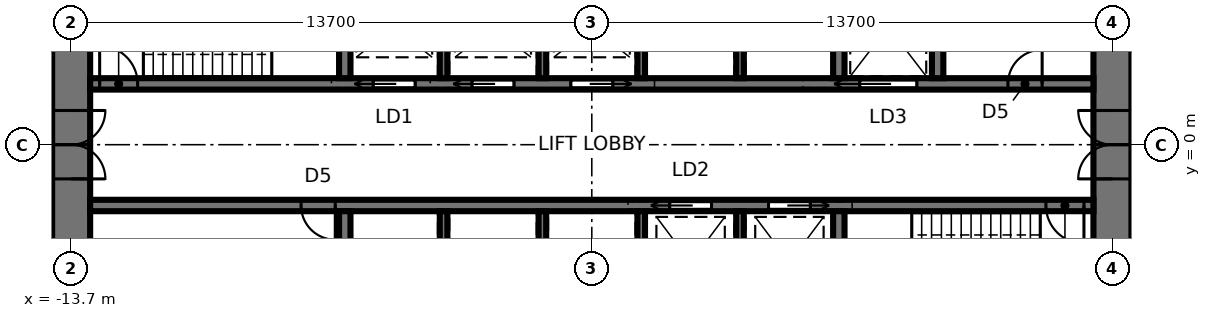
"""IFC4 building model, lengths in metres.
Left out: names, types, materials, properties, quantities, classifications, styles, units other than length and angle.
Written with IfcOpenShell. Run it as: python <this file> out.ifc"""

import sys

from ifc_helpers import new_model, si_unit, direction, frame, frame_2d, origin, place, context, subcontext, project, spatial, rectangle, extrude, element, fill, save


model = new_model("IFC4")
c1 = context("Model", 3, precision=1e-05, world=origin(), true_north=direction((0.0, 1.0)))
c2 = subcontext(c1, "Body", "Model", "MODEL_VIEW")
j1 = project(units=[si_unit("LENGTHUNIT", "METRE"), si_unit("PLANEANGLEUNIT", "RADIAN")], contexts=[c1])
p1 = place(None, origin())
s1 = spatial("IfcSite", under=j1, at=p1, CompositionType="ELEMENT")
p2 = place(p1, origin())
s2 = spatial("IfcBuilding", under=s1, at=p2, CompositionType="ELEMENT")
p3 = place(p2, frame((0.0, 0.0, 5.6)))
s3 = spatial("IfcBuildingStorey", under=s2, at=p3, CompositionType="ELEMENT", Elevation=5.6)
p4 = place(p3, frame((13.7, -9.5, 0.0), z_axis=(0.0, 0.0, 1.0), x_axis=(0.0, 1.0, 0.0)))
e1 = element("IfcWall", 1, at=p4, inside=s3, PredefinedType="SHEAR", context=c2, shape_type="SweptSolid", body=[
    extrude(rectangle(XDim=19.0, YDim=1.0, at=frame_2d((9.5, 0.0))), origin(), (0.0, 0.0, 1.0), 5.0),
])
p5 = place(p4, frame((8.6, 0.0, 0.0)))
e2 = element("IfcOpeningElement", 2, at=p5, cuts=e1, PredefinedType="OPENING", context=c2, shape_type="SweptSolid", body=[
    extrude(rectangle(XDim=1.8, YDim=2.4, at=frame_2d((0.9, 1.2))), frame((0.0, 0.51, 0.0), z_axis=(0.0, -1.0, 0.0), x_axis=(1.0, 0.0, 0.0)), (0.0, 0.0, 1.0), 1.02),
])
p6 = place(p3, frame((-13.7, 9.5, 0.0), z_axis=(0.0, 0.0, 1.0), x_axis=(0.0, -1.0, 0.0)))
e3 = element("IfcWall", 3, at=p6, inside=s3, PredefinedType="SHEAR", context=c2, shape_type="SweptSolid", body=[
    extrude(rectangle(XDim=19.0, YDim=1.0, at=frame_2d((9.5, 0.0))), origin(), (0.0, 0.0, 1.0), 5.0),
])
p7 = place(p6, frame((8.6, 0.0, 0.0)))
e4 = element("IfcOpeningElement", 4, at=p7, cuts=e3, PredefinedType="OPENING", context=c2, shape_type="SweptSolid", body=[
    extrude(rectangle(XDim=1.8, YDim=2.4, at=frame_2d((0.9, 1.2))), frame((0.0, 0.51, 0.0), z_axis=(0.0, -1.0, 0.0), x_axis=(1.0, 0.0, 0.0)), (0.0, 0.0, 1.0), 1.02),
])
p8 = place(p3, frame((-13.2, 1.6, 0.0), z_axis=(0.0, 0.0, 1.0), x_axis=(1.0, 0.0, 0.0)))
e5 = element("IfcWall", 5, at=p8, inside=s3, PredefinedType="SHEAR", context=c2, shape_type="SweptSolid", body=[
    extrude(rectangle(XDim=26.4, YDim=0.3, at=frame_2d((13.2, 0.0))), origin(), (0.0, 0.0, 1.0), 5.0),
])
p9 = place(p8, frame((0.25, 0.0, 0.0)))
e6 = element("IfcOpeningElement", 6, at=p9, cuts=e5, PredefinedType="OPENING", context=c2, shape_type="SweptSolid", body=[
    extrude(rectangle(XDim=1.0, YDim=2.1, at=frame_2d((0.5, 1.05))), frame((0.0, 0.16, 0.0), z_axis=(0.0, -1.0, 0.0), x_axis=(1.0, 0.0, 0.0)), (0.0, 0.0, 1.0), 0.32),
])
p10 = place(p8, frame((20.25, 0.0, 0.0)))
e7 = element("IfcOpeningElement", 7, at=p10, cuts=e5, PredefinedType="OPENING", context=c2, shape_type="SweptSolid", body=[
    extrude(rectangle(XDim=1.5, YDim=2.4, at=frame_2d((0.75, 1.2))), frame((0.0, 0.16, 0.0), z_axis=(0.0, -1.0, 0.0), x_axis=(1.0, 0.0, 0.0)), (0.0, 0.0, 1.0), 0.32),
])
p11 = place(p8, frame((7.45, 0.0, 0.0)))
e8 = element("IfcOpeningElement", 8, at=p11, cuts=e5, PredefinedType="OPENING", context=c2, shape_type="SweptSolid", body=[
    extrude(rectangle(XDim=1.1, YDim=2.3, at=frame_2d((0.55, 1.15))), frame((0.0, 0.16, 0.0), z_axis=(0.0, -1.0, 0.0), x_axis=(1.0, 0.0, 0.0)), (0.0, 0.0, 1.0), 0.32),
])
p12 = place(p8, frame((10.05, 0.0, 0.0)))
e9 = element("IfcOpeningElement", 9, at=p12, cuts=e5, PredefinedType="OPENING", context=c2, shape_type="SweptSolid", body=[
    extrude(rectangle(XDim=1.1, YDim=2.3, at=frame_2d((0.55, 1.15))), frame((0.0, 0.16, 0.0), z_axis=(0.0, -1.0, 0.0), x_axis=(1.0, 0.0, 0.0)), (0.0, 0.0, 1.0), 0.32),
])
p13 = place(p8, frame((12.65, 0.0, 0.0)))
e10 = element("IfcOpeningElement", 10, at=p13, cuts=e5, PredefinedType="OPENING", context=c2, shape_type="SweptSolid", body=[
    extrude(rectangle(XDim=1.1, YDim=2.3, at=frame_2d((0.55, 1.15))), frame((0.0, 0.16, 0.0), z_axis=(0.0, -1.0, 0.0), x_axis=(1.0, 0.0, 0.0)), (0.0, 0.0, 1.0), 0.32),
])
p14 = place(p8, frame((24.15, 0.0, 0.0)))
e11 = element("IfcOpeningElement", 11, at=p14, cuts=e5, PredefinedType="OPENING", context=c2, shape_type="SweptSolid", body=[
    extrude(rectangle(XDim=0.9, YDim=2.1, at=frame_2d((0.45, 1.05))), frame((0.0, 0.16, 0.0), z_axis=(0.0, -1.0, 0.0), x_axis=(1.0, 0.0, 0.0)), (0.0, 0.0, 1.0), 0.32),
])
p15 = place(p3, frame((-13.2, -1.6, 0.0), z_axis=(0.0, 0.0, 1.0), x_axis=(1.0, 0.0, 0.0)))
e12 = element("IfcWall", 12, at=p15, inside=s3, PredefinedType="SHEAR", context=c2, shape_type="SweptSolid", body=[
    extrude(rectangle(XDim=26.4, YDim=0.3, at=frame_2d((13.2, 0.0))), origin(), (0.0, 0.0, 1.0), 5.0),
])
p16 = place(p15, frame((25.15, 0.0, 0.0)))
e13 = element("IfcOpeningElement", 13, at=p16, cuts=e12, PredefinedType="OPENING", context=c2, shape_type="SweptSolid", body=[
    extrude(rectangle(XDim=1.0, YDim=2.1, at=frame_2d((0.5, 1.05))), frame((0.0, 0.16, 0.0), z_axis=(0.0, -1.0, 0.0), x_axis=(1.0, 0.0, 0.0)), (0.0, 0.0, 1.0), 0.32),
])
p17 = place(p15, frame((15.25, 0.0, 0.0)))
e14 = element("IfcOpeningElement", 14, at=p17, cuts=e12, PredefinedType="OPENING", context=c2, shape_type="SweptSolid", body=[
    extrude(rectangle(XDim=1.1, YDim=2.3, at=frame_2d((0.55, 1.15))), frame((0.0, 0.16, 0.0), z_axis=(0.0, -1.0, 0.0), x_axis=(1.0, 0.0, 0.0)), (0.0, 0.0, 1.0), 0.32),
])
p18 = place(p15, frame((17.85, 0.0, 0.0)))
e15 = element("IfcOpeningElement", 15, at=p18, cuts=e12, PredefinedType="OPENING", context=c2, shape_type="SweptSolid", body=[
    extrude(rectangle(XDim=1.1, YDim=2.3, at=frame_2d((0.55, 1.15))), frame((0.0, 0.16, 0.0), z_axis=(0.0, -1.0, 0.0), x_axis=(1.0, 0.0, 0.0)), (0.0, 0.0, 1.0), 0.32),
])
p19 = place(p15, frame((5.55, 0.0, 0.0)))
e16 = element("IfcOpeningElement", 16, at=p19, cuts=e12, PredefinedType="OPENING", context=c2, shape_type="SweptSolid", body=[
    extrude(rectangle(XDim=0.9, YDim=2.1, at=frame_2d((0.45, 1.05))), frame((0.0, 0.16, 0.0), z_axis=(0.0, -1.0, 0.0), x_axis=(1.0, 0.0, 0.0)), (0.0, 0.0, 1.0), 0.32),
])
for number, where, z_axis, x_axis in (
    (17, (-6.5, 1.75, 0.0), (0.0, 0.0, 1.0), (0.0, 1.0, 0.0)),
    (18, (6.5, 1.75, 0.0), (0.0, 0.0, 1.0), (0.0, 1.0, 0.0)),
):
    element("IfcWall", number, at=place(p3, frame(where, z_axis=z_axis, x_axis=x_axis)), inside=s3, PredefinedType="SHEAR", context=c2, shape_type="SweptSolid", body=[
        extrude(rectangle(XDim=2.7, YDim=0.3, at=frame_2d((1.35, 0.0))), origin(), (0.0, 0.0, 1.0), 5.0),
    ])
for number, where, z_axis, x_axis in (
    (19, (-3.9, 1.75, 0.0), (0.0, 0.0, 1.0), (0.0, 1.0, 0.0)),
    (20, (-1.3, 1.75, 0.0), (0.0, 0.0, 1.0), (0.0, 1.0, 0.0)),
    (21, (1.3, 1.75, 0.0), (0.0, 0.0, 1.0), (0.0, 1.0, 0.0)),
    (22, (3.9, 1.75, 0.0), (0.0, 0.0, 1.0), (0.0, 1.0, 0.0)),
):
    element("IfcWall", number, at=place(p3, frame(where, z_axis=z_axis, x_axis=x_axis)), inside=s3, PredefinedType="SHEAR", context=c2, shape_type="SweptSolid", body=[
        extrude(rectangle(XDim=2.7, YDim=0.2, at=frame_2d((1.35, 0.0))), origin(), (0.0, 0.0, 1.0), 5.0),
    ])
for number, where, z_axis, x_axis in (
    (23, (-6.5, -1.75, 0.0), (0.0, 0.0, 1.0), (0.0, -1.0, 0.0)),
    (24, (6.5, -1.75, 0.0), (0.0, 0.0, 1.0), (0.0, -1.0, 0.0)),
):
    element("IfcWall", number, at=place(p3, frame(where, z_axis=z_axis, x_axis=x_axis)), inside=s3, PredefinedType="SHEAR", context=c2, shape_type="SweptSolid", body=[
        extrude(rectangle(XDim=2.7, YDim=0.3, at=frame_2d((1.35, 0.0))), origin(), (0.0, 0.0, 1.0), 5.0),
    ])
for number, where, z_axis, x_axis in (
    (25, (-3.9, -1.75, 0.0), (0.0, 0.0, 1.0), (0.0, -1.0, 0.0)),
    (26, (-1.3, -1.75, 0.0), (0.0, 0.0, 1.0), (0.0, -1.0, 0.0)),
    (27, (1.3, -1.75, 0.0), (0.0, 0.0, 1.0), (0.0, -1.0, 0.0)),
    (28, (3.9, -1.75, 0.0), (0.0, 0.0, 1.0), (0.0, -1.0, 0.0)),
):
    element("IfcWall", number, at=place(p3, frame(where, z_axis=z_axis, x_axis=x_axis)), inside=s3, PredefinedType="SHEAR", context=c2, shape_type="SweptSolid", body=[
        extrude(rectangle(XDim=2.7, YDim=0.2, at=frame_2d((1.35, 0.0))), origin(), (0.0, 0.0, 1.0), 5.0),
    ])
p20 = place(p3, frame((9.1, 1.75, 0.0), z_axis=(0.0, 0.0, 1.0), x_axis=(0.0, 1.0, 0.0)))
e29 = element("IfcWall", 29, at=p20, inside=s3, PredefinedType="SHEAR", context=c2, shape_type="SweptSolid", body=[
    extrude(rectangle(XDim=2.7, YDim=0.3, at=frame_2d((1.35, 0.0))), origin(), (0.0, 0.0, 1.0), 5.0),
])
p21 = place(p7, origin())
e30 = element("IfcDoor", 30, at=p21, inside=s3, OperationType="DOUBLE_DOOR_SINGLE_SWING", PredefinedType="DOOR", context=c2, shape_type="SweptSolid", body=[
    extrude(rectangle(XDim=1.72, YDim=2.36, at=frame_2d((0.9, 1.18))), frame((0.0, 0.025, 0.0), z_axis=(0.0, -1.0, 0.0), x_axis=(1.0, 0.0, 0.0)), (0.0, 0.0, 1.0), 0.05),
    extrude(rectangle(XDim=0.04, YDim=2.4, at=frame_2d((0.02, 1.2))), frame((0.0, 0.25, 0.0), z_axis=(0.0, -1.0, 0.0), x_axis=(1.0, 0.0, 0.0)), (0.0, 0.0, 1.0), 0.5),
    extrude(rectangle(XDim=0.04, YDim=2.4, at=frame_2d((1.78, 1.2))), frame((0.0, 0.25, 0.0), z_axis=(0.0, -1.0, 0.0), x_axis=(1.0, 0.0, 0.0)), (0.0, 0.0, 1.0), 0.5),
    extrude(rectangle(XDim=1.72, YDim=0.04, at=frame_2d((0.9, 2.38))), frame((0.0, 0.25, 0.0), z_axis=(0.0, -1.0, 0.0), x_axis=(1.0, 0.0, 0.0)), (0.0, 0.0, 1.0), 0.5),
])
fill(e4, e30)
p22 = place(p5, origin())
e31 = element("IfcDoor", 31, at=p22, inside=s3, OperationType="DOUBLE_DOOR_SINGLE_SWING", PredefinedType="DOOR", context=c2, shape_type="SweptSolid", body=[
    extrude(rectangle(XDim=1.72, YDim=2.36, at=frame_2d((0.9, 1.18))), frame((0.0, 0.025, 0.0), z_axis=(0.0, -1.0, 0.0), x_axis=(1.0, 0.0, 0.0)), (0.0, 0.0, 1.0), 0.05),
    extrude(rectangle(XDim=0.04, YDim=2.4, at=frame_2d((0.02, 1.2))), frame((0.0, 0.25, 0.0), z_axis=(0.0, -1.0, 0.0), x_axis=(1.0, 0.0, 0.0)), (0.0, 0.0, 1.0), 0.5),
    extrude(rectangle(XDim=0.04, YDim=2.4, at=frame_2d((1.78, 1.2))), frame((0.0, 0.25, 0.0), z_axis=(0.0, -1.0, 0.0), x_axis=(1.0, 0.0, 0.0)), (0.0, 0.0, 1.0), 0.5),
    extrude(rectangle(XDim=1.72, YDim=0.04, at=frame_2d((0.9, 2.38))), frame((0.0, 0.25, 0.0), z_axis=(0.0, -1.0, 0.0), x_axis=(1.0, 0.0, 0.0)), (0.0, 0.0, 1.0), 0.5),
])
fill(e2, e31)
p23 = place(p9, origin())
e32 = element("IfcDoor", 32, at=p23, inside=s3, OperationType="SINGLE_SWING_LEFT", PredefinedType="DOOR", context=c2, shape_type="SweptSolid", body=[
    extrude(rectangle(XDim=1.0, YDim=2.1, at=frame_2d((0.5, 1.05))), frame((0.0, 0.025, 0.0), z_axis=(0.0, -1.0, 0.0), x_axis=(1.0, 0.0, 0.0)), (0.0, 0.0, 1.0), 0.05),
])
fill(e6, e32)
p24 = place(p16, frame((1.0, 0.0, 0.0), z_axis=(0.0, 0.0, 1.0), x_axis=(-1.0, 0.0, 0.0)))
e33 = element("IfcDoor", 33, at=p24, inside=s3, OperationType="SINGLE_SWING_LEFT", PredefinedType="DOOR", context=c2, shape_type="SweptSolid", body=[
    extrude(rectangle(XDim=1.0, YDim=2.1, at=frame_2d((0.5, 1.05))), frame((0.0, 0.025, 0.0), z_axis=(0.0, -1.0, 0.0), x_axis=(1.0, 0.0, 0.0)), (0.0, 0.0, 1.0), 0.05),
])
fill(e13, e33)
p25 = place(p10, origin())
e34 = element("IfcDoor", 34, at=p25, inside=s3, OperationType="SLIDING_TO_LEFT", PredefinedType="DOOR", context=c2, shape_type="SweptSolid", body=[
    extrude(rectangle(XDim=1.5, YDim=2.4, at=frame_2d((0.75, 1.2))), frame((0.0, 0.025, 0.0), z_axis=(0.0, -1.0, 0.0), x_axis=(1.0, 0.0, 0.0)), (0.0, 0.0, 1.0), 0.05),
])
fill(e7, e34)
p26 = place(p11, origin())
e35 = element("IfcDoor", 35, at=p26, inside=s3, OperationType="SLIDING_TO_LEFT", PredefinedType="DOOR", context=c2, shape_type="SweptSolid", body=[
    extrude(rectangle(XDim=1.1, YDim=2.3, at=frame_2d((0.55, 1.15))), frame((0.0, 0.025, 0.0), z_axis=(0.0, -1.0, 0.0), x_axis=(1.0, 0.0, 0.0)), (0.0, 0.0, 1.0), 0.05),
])
fill(e8, e35)
p27 = place(p12, origin())
e36 = element("IfcDoor", 36, at=p27, inside=s3, OperationType="SLIDING_TO_LEFT", PredefinedType="DOOR", context=c2, shape_type="SweptSolid", body=[
    extrude(rectangle(XDim=1.1, YDim=2.3, at=frame_2d((0.55, 1.15))), frame((0.0, 0.025, 0.0), z_axis=(0.0, -1.0, 0.0), x_axis=(1.0, 0.0, 0.0)), (0.0, 0.0, 1.0), 0.05),
])
fill(e9, e36)
p28 = place(p13, origin())
e37 = element("IfcDoor", 37, at=p28, inside=s3, OperationType="SLIDING_TO_RIGHT", PredefinedType="DOOR", context=c2, shape_type="SweptSolid", body=[
    extrude(rectangle(XDim=1.1, YDim=2.3, at=frame_2d((0.55, 1.15))), frame((0.0, 0.025, 0.0), z_axis=(0.0, -1.0, 0.0), x_axis=(1.0, 0.0, 0.0)), (0.0, 0.0, 1.0), 0.05),
])
fill(e10, e37)
p29 = place(p17, frame((1.1, 0.0, 0.0), z_axis=(0.0, 0.0, 1.0), x_axis=(-1.0, 0.0, 0.0)))
e38 = element("IfcDoor", 38, at=p29, inside=s3, OperationType="SLIDING_TO_RIGHT", PredefinedType="DOOR", context=c2, shape_type="SweptSolid", body=[
    extrude(rectangle(XDim=1.1, YDim=2.3, at=frame_2d((0.55, 1.15))), frame((0.0, 0.025, 0.0), z_axis=(0.0, -1.0, 0.0), x_axis=(1.0, 0.0, 0.0)), (0.0, 0.0, 1.0), 0.05),
])
fill(e14, e38)
p30 = place(p18, frame((1.1, 0.0, 0.0), z_axis=(0.0, 0.0, 1.0), x_axis=(-1.0, 0.0, 0.0)))
e39 = element("IfcDoor", 39, at=p30, inside=s3, OperationType="SLIDING_TO_LEFT", PredefinedType="DOOR", context=c2, shape_type="SweptSolid", body=[
    extrude(rectangle(XDim=1.1, YDim=2.3, at=frame_2d((0.55, 1.15))), frame((0.0, 0.025, 0.0), z_axis=(0.0, -1.0, 0.0), x_axis=(1.0, 0.0, 0.0)), (0.0, 0.0, 1.0), 0.05),
])
fill(e15, e39)
p31 = place(p14, origin())
e40 = element("IfcDoor", 40, at=p31, inside=s3, OperationType="SINGLE_SWING_RIGHT", PredefinedType="DOOR", context=c2, shape_type="SweptSolid", body=[
    extrude(rectangle(XDim=0.9, YDim=2.1, at=frame_2d((0.45, 1.05))), frame((0.0, 0.025, 0.0), z_axis=(0.0, -1.0, 0.0), x_axis=(1.0, 0.0, 0.0)), (0.0, 0.0, 1.0), 0.05),
])
fill(e11, e40)
p32 = place(p19, frame((0.9, 0.0, 0.0), z_axis=(0.0, 0.0, 1.0), x_axis=(-1.0, 0.0, 0.0)))
e41 = element("IfcDoor", 41, at=p32, inside=s3, OperationType="SINGLE_SWING_LEFT", PredefinedType="DOOR", context=c2, shape_type="SweptSolid", body=[
    extrude(rectangle(XDim=0.9, YDim=2.1, at=frame_2d((0.45, 1.05))), frame((0.0, 0.025, 0.0), z_axis=(0.0, -1.0, 0.0), x_axis=(1.0, 0.0, 0.0)), (0.0, 0.0, 1.0), 0.05),
])
fill(e16, e41)
save(model, sys.argv[1])
